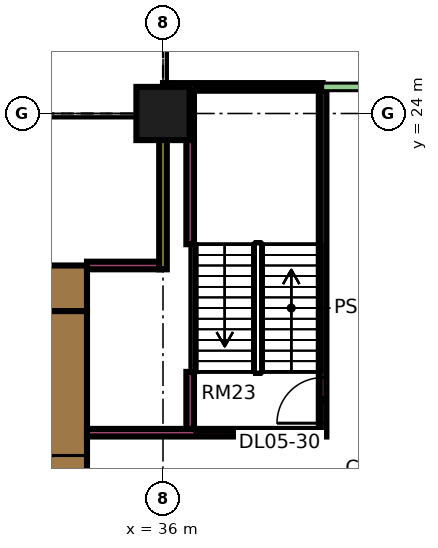
"""IFC4 building model, lengths in metres.
Left out: names, types, materials, properties, quantities, classifications, styles, units other than length and angle.
Written with IfcOpenShell. Run it as: python <this file> out.ifc"""

import sys

from ifc_helpers import new_model, si_unit, direction, frame, frame_2d, origin, origin_2d, place, context, subcontext, project, spatial, rectangle, extrude, element, fill, save


model = new_model("IFC4")
c1 = context("Model", 3, precision=1e-05, world=origin(), true_north=direction((0.0, 1.0)))
c2 = subcontext(c1, "Body", "Model", "MODEL_VIEW")
j1 = project(units=[si_unit("LENGTHUNIT", "METRE"), si_unit("PLANEANGLEUNIT", "RADIAN")], contexts=[c1])
p1 = place(None, origin())
s1 = spatial("IfcSite", under=j1, at=p1, CompositionType="ELEMENT")
p2 = place(p1, origin())
s2 = spatial("IfcBuilding", under=s1, at=p2, CompositionType="ELEMENT")
p3 = place(p2, frame((0.0, 0.0, 26.4)))
s3 = spatial("IfcBuildingStorey", under=s2, at=p3, CompositionType="ELEMENT", Elevation=26.4)
p4 = place(p3, frame((36.0, 24.0, 0.0), z_axis=(0.0, 0.0, 1.0), x_axis=(1.0, 0.0, 0.0)))
e1 = element("IfcColumn", 1, at=p4, inside=s3, PredefinedType="COLUMN", context=c2, shape_type="SweptSolid", body=[
    extrude(rectangle(XDim=1.4, YDim=1.4, at=origin_2d()), origin(), (0.0, 0.0, 1.0), 9.0),
])
p5 = place(p3, frame((9.0, 19.4, 0.0), z_axis=(0.0, 0.0, 1.0), x_axis=(1.0, 0.0, 0.0)))
e2 = element("IfcWall", 2, at=p5, inside=s3, PredefinedType="SHEAR", context=c2, shape_type="SweptSolid", body=[
    extrude(rectangle(XDim=25.0, YDim=1.2, at=frame_2d((12.5, 0.0))), origin(), (0.0, 0.0, 1.0), 9.0),
])
p6 = place(p5, frame((19.1, 0.0, 0.0)))
e3 = element("IfcOpeningElement", 3, at=p6, cuts=e2, PredefinedType="OPENING", context=c2, shape_type="SweptSolid", body=[
    extrude(rectangle(XDim=1.8, YDim=2.4, at=frame_2d((0.9, 1.2))), frame((0.0, 0.61, 0.0), z_axis=(0.0, -1.0, 0.0), x_axis=(1.0, 0.0, 0.0)), (0.0, 0.0, 1.0), 1.22),
])
p7 = place(p3, frame((33.4, 8.2, 0.0), z_axis=(0.0, 0.0, 1.0), x_axis=(0.0, 1.0, 0.0)))
e4 = element("IfcWall", 4, at=p7, inside=s3, PredefinedType="SHEAR", context=c2, shape_type="SweptSolid", body=[
    extrude(rectangle(XDim=10.6, YDim=1.2, at=frame_2d((5.3, 0.0))), origin(), (0.0, 0.0, 1.0), 9.0),
])
p8 = place(p7, frame((5.0, 0.0, 0.0)))
e5 = element("IfcOpeningElement", 5, at=p8, cuts=e4, PredefinedType="OPENING", context=c2, shape_type="SweptSolid", body=[
    extrude(rectangle(XDim=1.8, YDim=2.4, at=frame_2d((0.9, 1.2))), frame((0.0, 0.61, 0.0), z_axis=(0.0, -1.0, 0.0), x_axis=(1.0, 0.0, 0.0)), (0.0, 0.0, 1.0), 1.22),
])
p9 = place(p3, frame((34.0, 15.6, 0.0), z_axis=(0.0, 0.0, 1.0), x_axis=(1.0, 0.0, 0.0)))
e6 = element("IfcWall", 6, at=p9, inside=s3, PredefinedType="SOLIDWALL", context=c2, shape_type="SweptSolid", body=[
    extrude(rectangle(XDim=6.1, YDim=0.2, at=frame_2d((3.05, 0.0))), origin(), (0.0, 0.0, 1.0), 8.45),
])
p10 = place(p3, frame((34.0, 20.0, 0.0), z_axis=(0.0, 0.0, 1.0), x_axis=(1.0, 0.0, 0.0)))
e7 = element("IfcWall", 7, at=p10, inside=s3, PredefinedType="SOLIDWALL", context=c2, shape_type="SweptSolid", body=[
    extrude(rectangle(XDim=1.9, YDim=0.2, at=frame_2d((0.95, 0.0))), origin(), (0.0, 0.0, 1.0), 8.45),
])
p11 = place(p3, frame((36.0, 19.9, 0.0), z_axis=(0.0, 0.0, 1.0), x_axis=(0.0, 1.0, 0.0)))
e8 = element("IfcWall", 8, at=p11, inside=s3, PredefinedType="SOLIDWALL", context=c2, shape_type="SweptSolid", body=[
    extrude(rectangle(XDim=4.1, YDim=0.2, at=frame_2d((2.05, 0.0))), origin(), (0.0, 0.0, 1.0), 6.55),
])
p12 = place(p3, frame((36.0, 24.7, 0.0), z_axis=(0.0, 0.0, 1.0), x_axis=(1.0, 0.0, 0.0)))
e9 = element("IfcWall", 9, at=p12, inside=s3, PredefinedType="SOLIDWALL", context=c2, shape_type="SweptSolid", body=[
    extrude(rectangle(XDim=4.2, YDim=0.2, at=frame_2d((2.1, 0.0))), origin(), (0.0, 0.0, 1.0), 8.45),
])
p13 = place(p3, frame((40.2, 15.5, 0.0), z_axis=(0.0, 0.0, 1.0), x_axis=(0.0, 1.0, 0.0)))
e10 = element("IfcWall", 10, at=p13, inside=s3, PredefinedType="SOLIDWALL", context=c2, shape_type="SweptSolid", body=[
    extrude(rectangle(XDim=9.1, YDim=0.2, at=frame_2d((4.55, 0.0))), origin(), (0.0, 0.0, 1.0), 8.45),
])
p14 = place(p13, frame((0.35, 0.0, 0.0)))
e11 = element("IfcOpeningElement", 11, at=p14, cuts=e10, PredefinedType="OPENING", context=c2, shape_type="SweptSolid", body=[
    extrude(rectangle(XDim=1.2, YDim=2.1, at=frame_2d((0.6, 1.05))), frame((0.0, 0.11, 0.0), z_axis=(0.0, -1.0, 0.0), x_axis=(1.0, 0.0, 0.0)), (0.0, 0.0, 1.0), 0.22),
])
p15 = place(p3, frame((40.2, 24.7, 0.0), z_axis=(0.0, 0.0, 1.0), x_axis=(1.0, 0.0, 0.0)))
e12 = element("IfcWall", 12, at=p15, inside=s3, PredefinedType="PARTITIONING", context=c2, shape_type="SweptSolid", body=[
    extrude(rectangle(XDim=4.3, YDim=0.2, at=frame_2d((2.15, 0.0))), origin(), (0.0, 0.0, 1.0), 8.45),
])
p16 = place(p15, frame((1.15, 0.0, 0.0)))
e13 = element("IfcOpeningElement", 13, at=p16, cuts=e12, PredefinedType="OPENING", context=c2, shape_type="SweptSolid", body=[
    extrude(rectangle(XDim=1.8, YDim=2.1, at=frame_2d((0.9, 1.05))), frame((0.0, 0.11, 0.0), z_axis=(0.0, -1.0, 0.0), x_axis=(1.0, 0.0, 0.0)), (0.0, 0.0, 1.0), 0.22),
])
p17 = place(p3, frame((36.715, 20.56, 0.0), z_axis=(0.0, 0.0, 1.0), x_axis=(0.0, 1.0, 0.0)))
e14 = element("IfcWall", 14, at=p17, inside=s3, PredefinedType="SOLIDWALL", context=c2, shape_type="SweptSolid", body=[
    extrude(rectangle(XDim=4.04, YDim=0.2, at=frame_2d((2.02, 0.0))), origin(), (0.0, 0.0, 1.0), 8.45),
])
p18 = place(p3, frame((36.715, 15.7, 0.0), z_axis=(0.0, 0.0, 1.0), x_axis=(0.0, 1.0, 0.0)))
e15 = element("IfcWall", 15, at=p18, inside=s3, PredefinedType="SOLIDWALL", context=c2, shape_type="SweptSolid", body=[
    extrude(rectangle(XDim=1.5, YDim=0.2, at=frame_2d((0.75, 0.0))), origin(), (0.0, 0.0, 1.0), 8.45),
])
p19 = place(p8, origin())
e16 = element("IfcDoor", 16, at=p19, inside=s3, OperationType="DOUBLE_DOOR_SINGLE_SWING", PredefinedType="DOOR", context=c2, shape_type="SweptSolid", body=[
    extrude(rectangle(XDim=1.8, YDim=2.4, at=frame_2d((0.9, 1.2))), frame((0.0, 0.025, 0.0), z_axis=(0.0, -1.0, 0.0), x_axis=(1.0, 0.0, 0.0)), (0.0, 0.0, 1.0), 0.05),
])
fill(e5, e16)
p20 = place(p14, origin())
e17 = element("IfcDoor", 17, at=p20, inside=s3, OperationType="SINGLE_SWING_LEFT", PredefinedType="DOOR", context=c2, shape_type="SweptSolid", body=[
    extrude(rectangle(XDim=1.2, YDim=2.1, at=frame_2d((0.6, 1.05))), frame((0.0, 0.025, 0.0), z_axis=(0.0, -1.0, 0.0), x_axis=(1.0, 0.0, 0.0)), (0.0, 0.0, 1.0), 0.05),
])
fill(e11, e17)
save(model, sys.argv[1])
